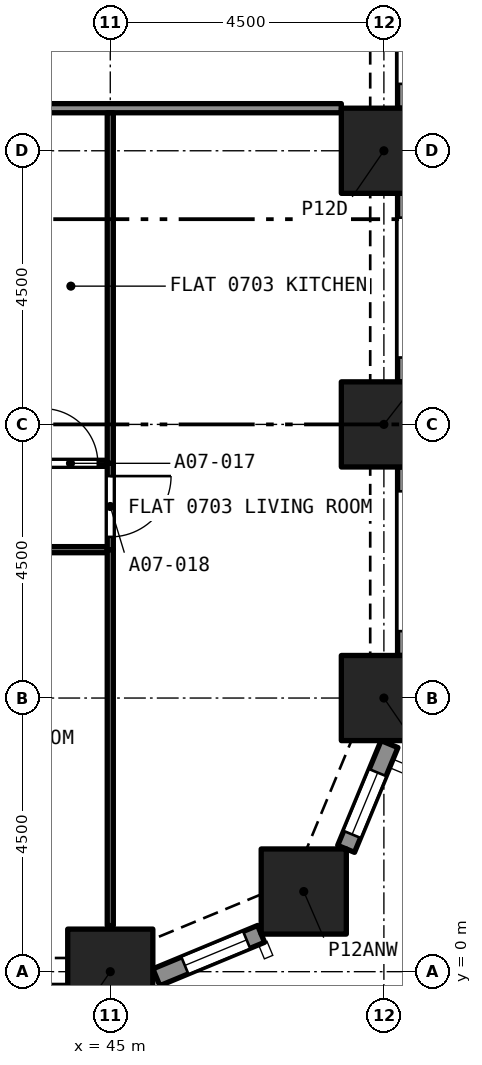
"""IFC4 building model, lengths in metres.
Left out: names, types, materials, properties, quantities, classifications, styles, units other than length and angle.
Written with IfcOpenShell. Run it as: python <this file> out.ifc"""

import sys

from ifc_helpers import new_model, si_unit, direction, frame, frame_2d, origin, origin_2d, place, context, subcontext, project, spatial, rectangle, extrude, element, fill, save


model = new_model("IFC4")
c1 = context("Model", 3, precision=1e-05, world=origin(), true_north=direction((0.0, 1.0)))
c2 = subcontext(c1, "Body", "Model", "MODEL_VIEW")
j1 = project(units=[si_unit("LENGTHUNIT", "METRE"), si_unit("PLANEANGLEUNIT", "RADIAN")], contexts=[c1])
p1 = place(None, origin())
s1 = spatial("IfcSite", under=j1, at=p1, CompositionType="ELEMENT")
p2 = place(p1, origin())
s2 = spatial("IfcBuilding", under=s1, at=p2, CompositionType="ELEMENT")
p3 = place(p2, frame((0.0, 0.0, 33.6)))
s3 = spatial("IfcBuildingStorey", under=s2, at=p3, CompositionType="ELEMENT", Elevation=33.6)
for number, where, z_axis, x_axis in (
    (1, (45.0, 0.0, 0.0), (0.0, 0.0, 1.0), (1.0, 0.0, 0.0)),
    (2, (48.182, 1.318, 0.0), (0.0, 0.0, 1.0), (1.0, 0.0, 0.0)),
    (3, (49.5, 4.5, 0.0), (0.0, 0.0, 1.0), (1.0, 0.0, 0.0)),
    (4, (49.5, 9.0, 0.0), (0.0, 0.0, 1.0), (1.0, 0.0, 0.0)),
    (5, (49.5, 13.5, 0.0), (0.0, 0.0, 1.0), (1.0, 0.0, 0.0)),
):
    element("IfcColumn", number, at=place(p3, frame(where, z_axis=z_axis, x_axis=x_axis)), inside=s3, PredefinedType="COLUMN", context=c2, shape_type="SweptSolid", body=[
        extrude(rectangle(XDim=1.4, YDim=1.4, at=origin_2d()), origin(), (0.0, 0.0, 1.0), 3.2),
    ])
p4 = place(p3, frame((47.48, 0.622, 0.0), z_axis=(0.0, 0.0, 1.0), x_axis=(-0.923903565336, -0.38262540684, 0.0)))
e6 = element("IfcWall", 6, at=p4, inside=s3, PredefinedType="SOLIDWALL", context=c2, shape_type="SweptSolid", body=[
    extrude(rectangle(XDim=1.865, YDim=0.3, at=frame_2d((0.933, 0.0))), origin(), (0.0, 0.0, 1.0), 3.2),
])
p5 = place(p4, frame((0.258, 0.0, 0.45)))
e7 = element("IfcOpeningElement", 7, at=p5, cuts=e6, PredefinedType="OPENING", context=c2, shape_type="SweptSolid", body=[
    extrude(rectangle(XDim=1.1, YDim=1.95, at=frame_2d((0.55, 0.975))), frame((0.0, 0.16, 0.0), z_axis=(0.0, -1.0, 0.0), x_axis=(1.0, 0.0, 0.0)), (0.0, 0.0, 1.0), 0.32),
])
p6 = place(p3, frame((49.592, 3.743, 0.0), z_axis=(0.0, 0.0, 1.0), x_axis=(-0.382737135771, -0.923857286003, 0.0)))
e8 = element("IfcWall", 8, at=p6, inside=s3, PredefinedType="SOLIDWALL", context=c2, shape_type="SweptSolid", body=[
    extrude(rectangle(XDim=1.865, YDim=0.3, at=frame_2d((0.933, 0.0))), origin(), (0.0, 0.0, 1.0), 3.2),
])
p7 = place(p6, frame((0.508, 0.0, 0.45)))
e9 = element("IfcOpeningElement", 9, at=p7, cuts=e8, PredefinedType="OPENING", context=c2, shape_type="SweptSolid", body=[
    extrude(rectangle(XDim=1.1, YDim=1.95, at=frame_2d((0.55, 0.975))), frame((0.0, 0.16, 0.0), z_axis=(0.0, -1.0, 0.0), x_axis=(1.0, 0.0, 0.0)), (0.0, 0.0, 1.0), 0.32),
])
p8 = place(p3, frame((49.875, 8.3, 0.0), z_axis=(0.0, 0.0, 1.0), x_axis=(0.0, -1.0, 0.0)))
e10 = element("IfcWall", 10, at=p8, inside=s3, PredefinedType="SOLIDWALL", context=c2, shape_type="SweptSolid", body=[
    extrude(rectangle(XDim=3.1, YDim=0.3, at=frame_2d((1.55, 0.0))), origin(), (0.0, 0.0, 1.0), 3.2),
])
p9 = place(p8, frame((0.4, 0.0, 0.45)))
e11 = element("IfcOpeningElement", 11, at=p9, cuts=e10, PredefinedType="OPENING", context=c2, shape_type="SweptSolid", body=[
    extrude(rectangle(XDim=2.3, YDim=1.95, at=frame_2d((1.15, 0.975))), frame((0.0, 0.16, 0.0), z_axis=(0.0, -1.0, 0.0), x_axis=(1.0, 0.0, 0.0)), (0.0, 0.0, 1.0), 0.32),
])
p10 = place(p3, frame((49.875, 12.8, 0.0), z_axis=(0.0, 0.0, 1.0), x_axis=(0.0, -1.0, 0.0)))
e12 = element("IfcWall", 12, at=p10, inside=s3, PredefinedType="SOLIDWALL", context=c2, shape_type="SweptSolid", body=[
    extrude(rectangle(XDim=3.1, YDim=0.3, at=frame_2d((1.55, 0.0))), origin(), (0.0, 0.0, 1.0), 3.2),
])
p11 = place(p10, frame((0.4, 0.0, 0.45)))
e13 = element("IfcOpeningElement", 13, at=p11, cuts=e12, PredefinedType="OPENING", context=c2, shape_type="SweptSolid", body=[
    extrude(rectangle(XDim=2.3, YDim=1.95, at=frame_2d((1.15, 0.975))), frame((0.0, 0.16, 0.0), z_axis=(0.0, -1.0, 0.0), x_axis=(1.0, 0.0, 0.0)), (0.0, 0.0, 1.0), 0.32),
])
p12 = place(p3, frame((49.875, 17.3, 0.0), z_axis=(0.0, 0.0, 1.0), x_axis=(0.0, -1.0, 0.0)))
e14 = element("IfcWall", 14, at=p12, inside=s3, PredefinedType="SOLIDWALL", context=c2, shape_type="SweptSolid", body=[
    extrude(rectangle(XDim=3.1, YDim=0.3, at=frame_2d((1.55, 0.0))), origin(), (0.0, 0.0, 1.0), 3.2),
])
p13 = place(p12, frame((0.4, 0.0, 0.45)))
e15 = element("IfcOpeningElement", 15, at=p13, cuts=e14, PredefinedType="OPENING", context=c2, shape_type="SweptSolid", body=[
    extrude(rectangle(XDim=2.3, YDim=1.95, at=frame_2d((1.15, 0.975))), frame((0.0, 0.16, 0.0), z_axis=(0.0, -1.0, 0.0), x_axis=(1.0, 0.0, 0.0)), (0.0, 0.0, 1.0), 0.32),
])
p14 = place(p3, frame((42.6, 14.2, 0.0), z_axis=(0.0, 0.0, 1.0), x_axis=(1.0, 0.0, 0.0)))
e16 = element("IfcWall", 16, at=p14, inside=s3, PredefinedType="PARTITIONING", context=c2, shape_type="SweptSolid", body=[
    extrude(rectangle(XDim=6.2, YDim=0.15, at=frame_2d((3.1, 0.0))), origin(), (0.0, 0.0, 1.0), 2.9),
])
p15 = place(p3, frame((44.95, 6.94, 0.0), z_axis=(0.0, 0.0, 1.0), x_axis=(-1.0, 0.0, 0.0)))
e17 = element("IfcWall", 17, at=p15, inside=s3, PredefinedType="PARTITIONING", context=c2, shape_type="SweptSolid", body=[
    extrude(rectangle(XDim=4.35, YDim=0.1, at=frame_2d((2.175, 0.0))), origin(), (0.0, 0.0, 1.0), 2.9),
])
p16 = place(p15, frame((1.75, 0.0, 0.0)))
e18 = element("IfcOpeningElement", 18, at=p16, cuts=e17, PredefinedType="OPENING", context=c2, shape_type="SweptSolid", body=[
    extrude(rectangle(XDim=0.9, YDim=2.1, at=frame_2d((0.45, 1.05))), frame((0.0, 0.06, 0.0), z_axis=(0.0, -1.0, 0.0), x_axis=(1.0, 0.0, 0.0)), (0.0, 0.0, 1.0), 0.12),
])
p17 = place(p3, frame((45.0, 0.758, 0.0), z_axis=(0.0, 0.0, 1.0), x_axis=(0.0, 1.0, 0.0)))
e19 = element("IfcWall", 19, at=p17, inside=s3, PredefinedType="PARTITIONING", context=c2, shape_type="SweptSolid", body=[
    extrude(rectangle(XDim=6.182, YDim=0.1, at=frame_2d((3.091, 0.0))), origin(), (0.0, 0.0, 1.0), 2.9),
])
p18 = place(p3, frame((43.691, 8.36, 0.0), z_axis=(0.0, 0.0, 1.0), x_axis=(1.0, 0.0, 0.0)))
e20 = element("IfcWall", 20, at=p18, inside=s3, PredefinedType="PARTITIONING", context=c2, shape_type="SweptSolid", body=[
    extrude(rectangle(XDim=1.259, YDim=0.1, at=frame_2d((0.629, 0.0))), origin(), (0.0, 0.0, 1.0), 2.9),
])
p19 = place(p18, frame((0.205, 0.0, 0.0)))
e21 = element("IfcOpeningElement", 21, at=p19, cuts=e20, PredefinedType="OPENING", context=c2, shape_type="SweptSolid", body=[
    extrude(rectangle(XDim=0.9, YDim=2.1, at=frame_2d((0.45, 1.05))), frame((0.0, 0.06, 0.0), z_axis=(0.0, -1.0, 0.0), x_axis=(1.0, 0.0, 0.0)), (0.0, 0.0, 1.0), 0.12),
])
p20 = place(p3, frame((45.0, 8.36, 0.0), z_axis=(0.0, 0.0, 1.0), x_axis=(0.0, -1.0, 0.0)))
e22 = element("IfcWall", 22, at=p20, inside=s3, PredefinedType="PARTITIONING", context=c2, shape_type="SweptSolid", body=[
    extrude(rectangle(XDim=1.42, YDim=0.1, at=frame_2d((0.71, 0.0))), origin(), (0.0, 0.0, 1.0), 2.9),
])
p21 = place(p20, frame((0.21, 0.0, 0.0)))
e23 = element("IfcOpeningElement", 23, at=p21, cuts=e22, PredefinedType="OPENING", context=c2, shape_type="SweptSolid", body=[
    extrude(rectangle(XDim=1.0, YDim=2.1, at=frame_2d((0.5, 1.05))), frame((0.0, 0.06, 0.0), z_axis=(0.0, -1.0, 0.0), x_axis=(1.0, 0.0, 0.0)), (0.0, 0.0, 1.0), 0.12),
])
p22 = place(p3, frame((45.0, 8.36, 0.0), z_axis=(0.0, 0.0, 1.0), x_axis=(0.0, 1.0, 0.0)))
e24 = element("IfcWall", 24, at=p22, inside=s3, PredefinedType="PARTITIONING", context=c2, shape_type="SweptSolid", body=[
    extrude(rectangle(XDim=5.765, YDim=0.1, at=frame_2d((2.882, 0.0))), origin(), (0.0, 0.0, 1.0), 2.9),
])
p23 = place(p5, origin())
e25 = element("IfcWindow", 25, at=p23, inside=s3, PartitioningType="SINGLE_PANEL", PredefinedType="WINDOW", context=c2, shape_type="SweptSolid", body=[
    extrude(rectangle(XDim=1.1, YDim=1.95, at=frame_2d((0.55, 0.975))), frame((0.0, 0.03, 0.0), z_axis=(0.0, -1.0, 0.0), x_axis=(1.0, 0.0, 0.0)), (0.0, 0.0, 1.0), 0.06),
])
fill(e7, e25)
p24 = place(p7, origin())
e26 = element("IfcWindow", 26, at=p24, inside=s3, PartitioningType="SINGLE_PANEL", PredefinedType="WINDOW", context=c2, shape_type="SweptSolid", body=[
    extrude(rectangle(XDim=1.1, YDim=1.95, at=frame_2d((0.55, 0.975))), frame((0.0, 0.03, 0.0), z_axis=(0.0, -1.0, 0.0), x_axis=(1.0, 0.0, 0.0)), (0.0, 0.0, 1.0), 0.06),
])
fill(e9, e26)
p25 = place(p19, origin())
e27 = element("IfcDoor", 27, at=p25, inside=s3, OperationType="SINGLE_SWING_RIGHT", PredefinedType="DOOR", context=c2, shape_type="SweptSolid", body=[
    extrude(rectangle(XDim=0.9, YDim=2.1, at=frame_2d((0.45, 1.05))), frame((0.0, 0.025, 0.0), z_axis=(0.0, -1.0, 0.0), x_axis=(1.0, 0.0, 0.0)), (0.0, 0.0, 1.0), 0.05),
])
fill(e21, e27)
p26 = place(p21, origin())
e28 = element("IfcDoor", 28, at=p26, inside=s3, OperationType="SINGLE_SWING_LEFT", PredefinedType="DOOR", context=c2, shape_type="SweptSolid", body=[
    extrude(rectangle(XDim=1.0, YDim=2.1, at=frame_2d((0.5, 1.05))), frame((0.0, 0.025, 0.0), z_axis=(0.0, -1.0, 0.0), x_axis=(1.0, 0.0, 0.0)), (0.0, 0.0, 1.0), 0.05),
])
fill(e23, e28)
save(model, sys.argv[1])
